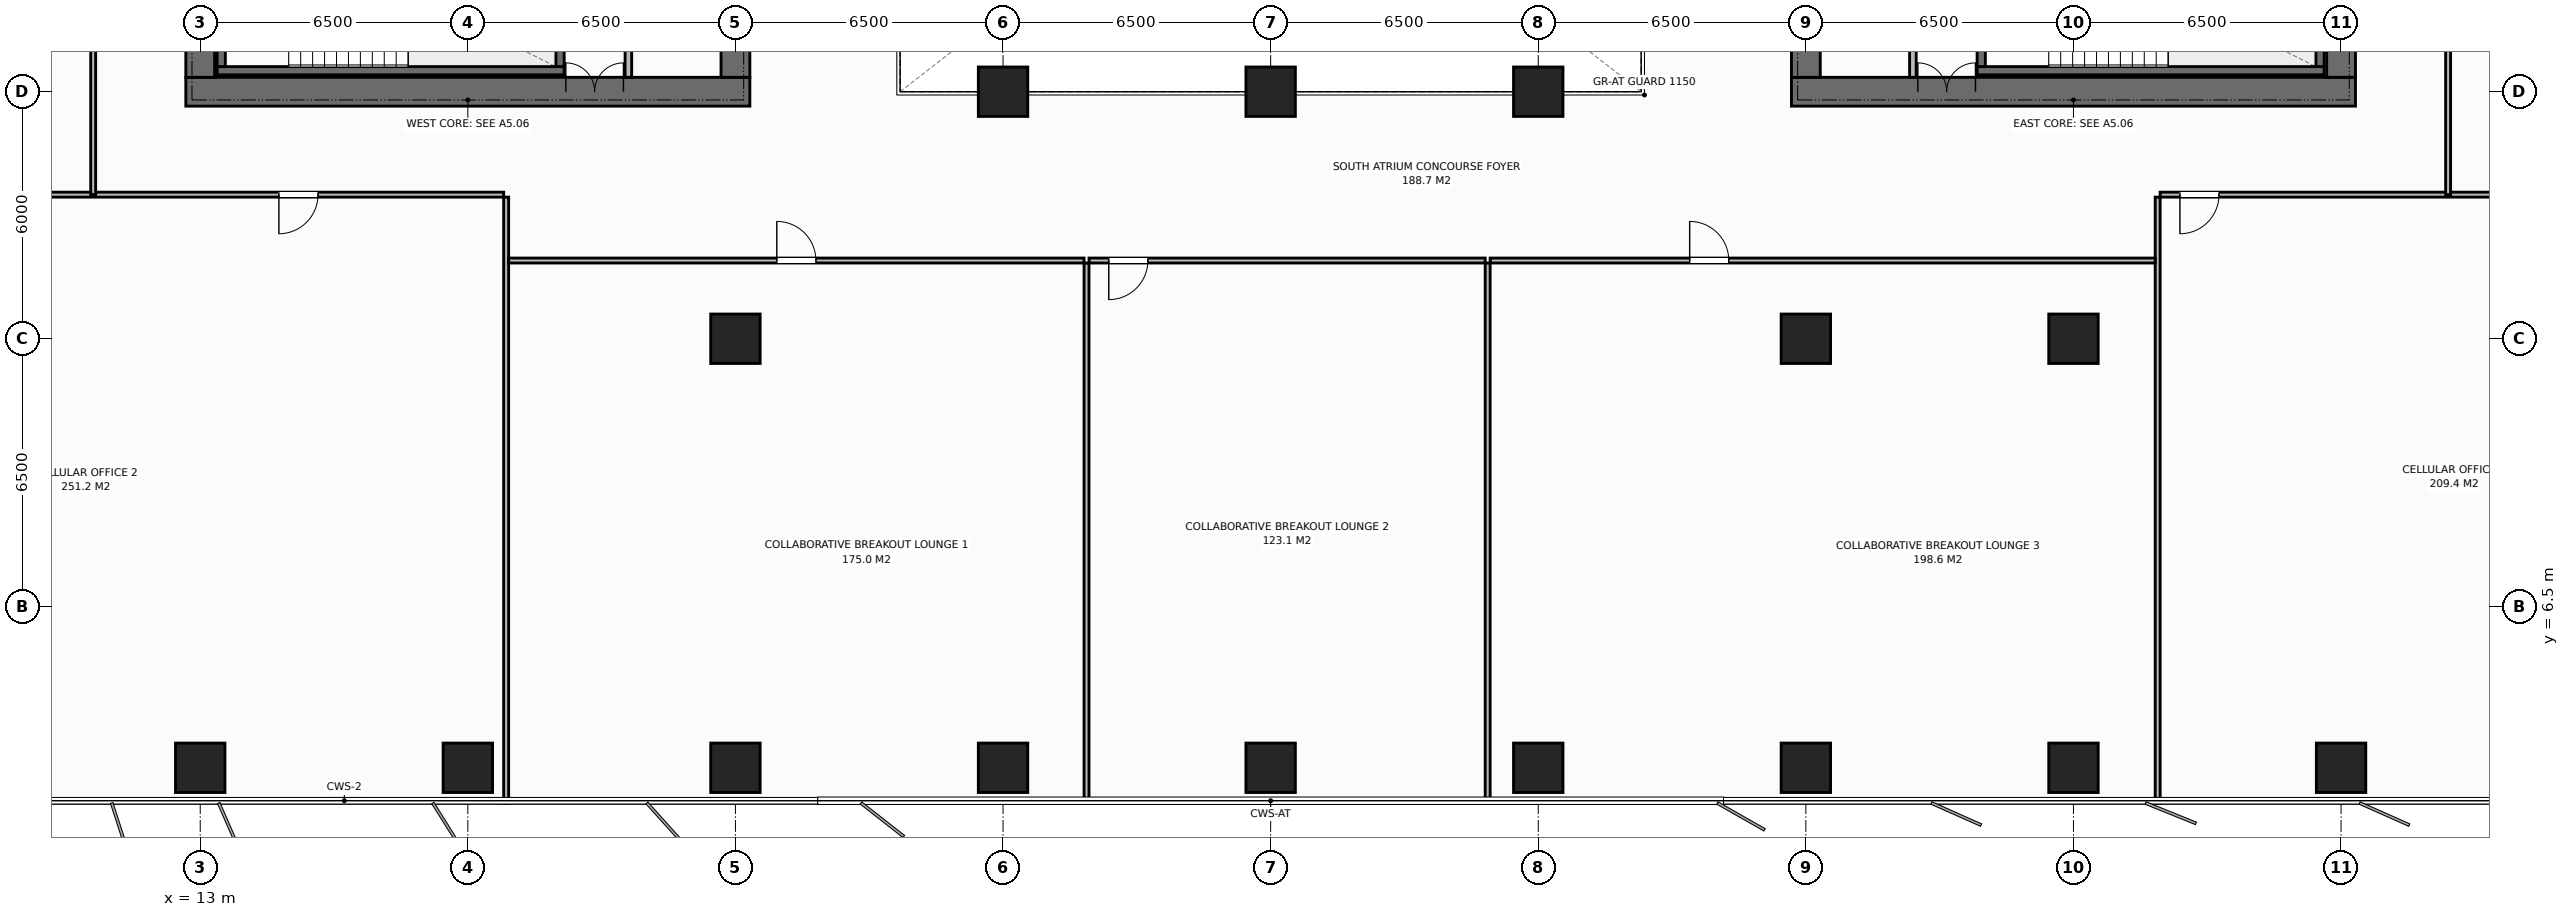
"""IFC4 building model, lengths in metres.
Left out: names, types, materials, properties, quantities, classifications, styles, units other than length and angle.
Written with IfcOpenShell. Run it as: python <this file> out.ifc"""

import sys

from ifc_helpers import new_model, si_unit, direction, frame, frame_2d, origin, origin_2d, place, context, subcontext, project, spatial, rectangle, extrude, element, fill, save


model = new_model("IFC4")
c1 = context("Model", 3, precision=1e-05, world=origin(), true_north=direction((0.0, 1.0)))
c2 = subcontext(c1, "Body", "Model", "MODEL_VIEW")
j1 = project(units=[si_unit("LENGTHUNIT", "METRE"), si_unit("PLANEANGLEUNIT", "RADIAN")], contexts=[c1])
p1 = place(None, origin())
s1 = spatial("IfcSite", under=j1, at=p1, CompositionType="ELEMENT")
p2 = place(p1, origin())
s2 = spatial("IfcBuilding", under=s1, at=p2, CompositionType="ELEMENT")
p3 = place(p2, frame((0.0, 0.0, 105.0)))
s3 = spatial("IfcBuildingStorey", under=s2, at=p3, CompositionType="ELEMENT", Elevation=105.0)
p4 = place(p3, frame((12.65, 19.0, 0.0), z_axis=(0.0, 0.0, 1.0), x_axis=(1.0, 0.0, 0.0)))
e1 = element("IfcWall", 1, at=p4, inside=s3, PredefinedType="SHEAR", context=c2, shape_type="SweptSolid", body=[
    extrude(rectangle(XDim=13.7, YDim=0.7, at=frame_2d((6.85, 0.0))), origin(), (0.0, 0.0, 1.0), 3.8),
])
p5 = place(p4, frame((9.23, 0.0, 0.0)))
e2 = element("IfcOpeningElement", 2, at=p5, cuts=e1, PredefinedType="OPENING", context=c2, shape_type="SweptSolid", body=[
    extrude(rectangle(XDim=1.4, YDim=2.2, at=frame_2d((0.7, 1.1))), frame((0.0, 0.36, 0.0), z_axis=(0.0, -1.0, 0.0), x_axis=(1.0, 0.0, 0.0)), (0.0, 0.0, 1.0), 0.72),
])
p6 = place(p3, frame((13.0, 19.35, 0.0), z_axis=(0.0, 0.0, 1.0), x_axis=(0.0, 1.0, 0.0)))
e3 = element("IfcWall", 3, at=p6, inside=s3, PredefinedType="SHEAR", context=c2, shape_type="SweptSolid", body=[
    extrude(rectangle(XDim=13.3, YDim=0.7, at=frame_2d((6.65, 0.0))), origin(), (0.0, 0.0, 1.0), 3.8),
])
p7 = place(p6, frame((4.7, 0.0, 0.0)))
e4 = element("IfcOpeningElement", 4, at=p7, cuts=e3, PredefinedType="OPENING", context=c2, shape_type="SweptSolid", body=[
    extrude(rectangle(XDim=1.4, YDim=2.2, at=frame_2d((0.7, 1.1))), frame((0.0, 0.36, 0.0), z_axis=(0.0, -1.0, 0.0), x_axis=(1.0, 0.0, 0.0)), (0.0, 0.0, 1.0), 0.72),
])
p8 = place(p3, frame((26.0, 19.35, 0.0), z_axis=(0.0, 0.0, 1.0), x_axis=(0.0, 1.0, 0.0)))
e5 = element("IfcWall", 5, at=p8, inside=s3, PredefinedType="SHEAR", context=c2, shape_type="SweptSolid", body=[
    extrude(rectangle(XDim=13.3, YDim=0.7, at=frame_2d((6.65, 0.0))), origin(), (0.0, 0.0, 1.0), 3.8),
])
p9 = place(p3, frame((51.65, 19.0, 0.0), z_axis=(0.0, 0.0, 1.0), x_axis=(1.0, 0.0, 0.0)))
e6 = element("IfcWall", 6, at=p9, inside=s3, PredefinedType="SHEAR", context=c2, shape_type="SweptSolid", body=[
    extrude(rectangle(XDim=13.7, YDim=0.7, at=frame_2d((6.85, 0.0))), origin(), (0.0, 0.0, 1.0), 3.8),
])
p10 = place(p9, frame((3.07, 0.0, 0.0)))
e7 = element("IfcOpeningElement", 7, at=p10, cuts=e6, PredefinedType="OPENING", context=c2, shape_type="SweptSolid", body=[
    extrude(rectangle(XDim=1.4, YDim=2.2, at=frame_2d((0.7, 1.1))), frame((0.0, 0.36, 0.0), z_axis=(0.0, -1.0, 0.0), x_axis=(1.0, 0.0, 0.0)), (0.0, 0.0, 1.0), 0.72),
])
p11 = place(p3, frame((52.0, 19.35, 0.0), z_axis=(0.0, 0.0, 1.0), x_axis=(0.0, 1.0, 0.0)))
e8 = element("IfcWall", 8, at=p11, inside=s3, PredefinedType="SHEAR", context=c2, shape_type="SweptSolid", body=[
    extrude(rectangle(XDim=13.3, YDim=0.7, at=frame_2d((6.65, 0.0))), origin(), (0.0, 0.0, 1.0), 3.8),
])
p12 = place(p3, frame((65.0, 19.35, 0.0), z_axis=(0.0, 0.0, 1.0), x_axis=(0.0, 1.0, 0.0)))
e9 = element("IfcWall", 9, at=p12, inside=s3, PredefinedType="SHEAR", context=c2, shape_type="SweptSolid", body=[
    extrude(rectangle(XDim=13.3, YDim=0.7, at=frame_2d((6.65, 0.0))), origin(), (0.0, 0.0, 1.0), 3.8),
])
p13 = place(p12, frame((8.1, 0.0, 0.0)))
e10 = element("IfcOpeningElement", 10, at=p13, cuts=e9, PredefinedType="OPENING", context=c2, shape_type="SweptSolid", body=[
    extrude(rectangle(XDim=1.3, YDim=2.2, at=frame_2d((0.65, 1.1))), frame((0.0, 0.36, 0.0), z_axis=(0.0, -1.0, 0.0), x_axis=(1.0, 0.0, 0.0)), (0.0, 0.0, 1.0), 0.72),
])
p14 = place(p3, frame((13.41, 19.51, 0.0), z_axis=(0.0, 0.0, 1.0), x_axis=(1.0, 0.0, 0.0)))
e11 = element("IfcWall", 11, at=p14, inside=s3, PredefinedType="SHEAR", context=c2, shape_type="SweptSolid", body=[
    extrude(rectangle(XDim=8.43, YDim=0.2, at=frame_2d((4.215, 0.0))), origin(), (0.0, 0.0, 1.0), 3.8),
])
for number, where, z_axis, x_axis in (
    (12, (13.51, 19.61, 0.0), (0.0, 0.0, 1.0), (0.0, 1.0, 0.0)),
    (13, (21.74, 19.61, 0.0), (0.0, 0.0, 1.0), (0.0, 1.0, 0.0)),
):
    element("IfcWall", number, at=place(p3, frame(where, z_axis=z_axis, x_axis=x_axis)), inside=s3, PredefinedType="SHEAR", context=c2, shape_type="SweptSolid", body=[
        extrude(rectangle(XDim=3.28, YDim=0.2, at=frame_2d((1.64, 0.0))), origin(), (0.0, 0.0, 1.0), 3.8),
    ])
p15 = place(p3, frame((56.16, 19.51, 0.0), z_axis=(0.0, 0.0, 1.0), x_axis=(1.0, 0.0, 0.0)))
e14 = element("IfcWall", 14, at=p15, inside=s3, PredefinedType="SHEAR", context=c2, shape_type="SweptSolid", body=[
    extrude(rectangle(XDim=8.43, YDim=0.2, at=frame_2d((4.215, 0.0))), origin(), (0.0, 0.0, 1.0), 3.8),
])
for number, where, z_axis, x_axis in (
    (15, (56.26, 19.61, 0.0), (0.0, 0.0, 1.0), (0.0, 1.0, 0.0)),
    (16, (64.49, 19.61, 0.0), (0.0, 0.0, 1.0), (0.0, 1.0, 0.0)),
):
    element("IfcWall", number, at=place(p3, frame(where, z_axis=z_axis, x_axis=x_axis)), inside=s3, PredefinedType="SHEAR", context=c2, shape_type="SweptSolid", body=[
        extrude(rectangle(XDim=3.28, YDim=0.2, at=frame_2d((1.64, 0.0))), origin(), (0.0, 0.0, 1.0), 3.8),
    ])
for number, where, z_axis, x_axis in (
    (17, (58.5, 13.0, 0.0), (0.0, 0.0, 1.0), (1.0, 0.0, 0.0)),
    (18, (32.5, 19.0, 0.0), (0.0, 0.0, 1.0), (1.0, 0.0, 0.0)),
    (19, (39.0, 19.0, 0.0), (0.0, 0.0, 1.0), (1.0, 0.0, 0.0)),
    (20, (45.5, 19.0, 0.0), (0.0, 0.0, 1.0), (1.0, 0.0, 0.0)),
    (21, (26.0, 13.0, 0.0), (0.0, 0.0, 1.0), (1.0, 0.0, 0.0)),
    (22, (52.0, 13.0, 0.0), (0.0, 0.0, 1.0), (1.0, 0.0, 0.0)),
    (23, (13.0, 2.58, 0.0), (0.0, 0.0, 1.0), (1.0, 0.0, 0.0)),
    (24, (19.5, 2.58, 0.0), (0.0, 0.0, 1.0), (1.0, 0.0, 0.0)),
    (25, (26.0, 2.58, 0.0), (0.0, 0.0, 1.0), (1.0, 0.0, 0.0)),
    (26, (32.5, 2.58, 0.0), (0.0, 0.0, 1.0), (1.0, 0.0, 0.0)),
    (27, (39.0, 2.58, 0.0), (0.0, 0.0, 1.0), (1.0, 0.0, 0.0)),
    (28, (45.5, 2.58, 0.0), (0.0, 0.0, 1.0), (1.0, 0.0, 0.0)),
    (29, (52.0, 2.58, 0.0), (0.0, 0.0, 1.0), (1.0, 0.0, 0.0)),
    (30, (58.5, 2.58, 0.0), (0.0, 0.0, 1.0), (1.0, 0.0, 0.0)),
    (31, (65.0, 2.58, 0.0), (0.0, 0.0, 1.0), (1.0, 0.0, 0.0)),
):
    element("IfcColumn", number, at=place(p3, frame(where, z_axis=z_axis, x_axis=x_axis)), inside=s3, PredefinedType="COLUMN", context=c2, shape_type="SweptSolid", body=[
        extrude(rectangle(XDim=1.2, YDim=1.2, at=origin_2d()), origin(), (0.0, 0.0, 1.0), 3.8),
    ])
p16 = place(p3, frame((23.4, 19.35, 0.0), z_axis=(0.0, 0.0, 1.0), x_axis=(0.0, 1.0, 0.0)))
e32 = element("IfcWall", 32, at=p16, inside=s3, PredefinedType="STANDARD", context=c2, shape_type="SweptSolid", body=[
    extrude(rectangle(XDim=13.3, YDim=0.16, at=frame_2d((6.65, 0.0))), origin(), (0.0, 0.0, 1.0), 3.565),
])
p17 = place(p16, frame((1.65, 0.0, 0.0)))
e33 = element("IfcOpeningElement", 33, at=p17, cuts=e32, PredefinedType="OPENING", context=c2, shape_type="SweptSolid", body=[
    extrude(rectangle(XDim=0.95, YDim=2.15, at=frame_2d((0.475, 1.075))), frame((0.0, 0.09, 0.0), z_axis=(0.0, -1.0, 0.0), x_axis=(1.0, 0.0, 0.0)), (0.0, 0.0, 1.0), 0.18),
])
p18 = place(p16, frame((4.95, 0.0, 0.0)))
e34 = element("IfcOpeningElement", 34, at=p18, cuts=e32, PredefinedType="OPENING", context=c2, shape_type="SweptSolid", body=[
    extrude(rectangle(XDim=1.1, YDim=2.2, at=frame_2d((0.55, 1.1))), frame((0.0, 0.09, 0.0), z_axis=(0.0, -1.0, 0.0), x_axis=(1.0, 0.0, 0.0)), (0.0, 0.0, 1.0), 0.18),
])
p19 = place(p16, frame((7.1, 0.0, 0.0)))
e35 = element("IfcOpeningElement", 35, at=p19, cuts=e32, PredefinedType="OPENING", context=c2, shape_type="SweptSolid", body=[
    extrude(rectangle(XDim=1.1, YDim=2.2, at=frame_2d((0.55, 1.1))), frame((0.0, 0.09, 0.0), z_axis=(0.0, -1.0, 0.0), x_axis=(1.0, 0.0, 0.0)), (0.0, 0.0, 1.0), 0.18),
])
p20 = place(p3, frame((54.6, 19.35, 0.0), z_axis=(0.0, 0.0, 1.0), x_axis=(0.0, 1.0, 0.0)))
e36 = element("IfcWall", 36, at=p20, inside=s3, PredefinedType="STANDARD", context=c2, shape_type="SweptSolid", body=[
    extrude(rectangle(XDim=13.3, YDim=0.16, at=frame_2d((6.65, 0.0))), origin(), (0.0, 0.0, 1.0), 3.565),
])
p21 = place(p20, frame((1.65, 0.0, 0.0)))
e37 = element("IfcOpeningElement", 37, at=p21, cuts=e36, PredefinedType="OPENING", context=c2, shape_type="SweptSolid", body=[
    extrude(rectangle(XDim=0.95, YDim=2.15, at=frame_2d((0.475, 1.075))), frame((0.0, 0.09, 0.0), z_axis=(0.0, -1.0, 0.0), x_axis=(1.0, 0.0, 0.0)), (0.0, 0.0, 1.0), 0.18),
])
p22 = place(p20, frame((4.95, 0.0, 0.0)))
e38 = element("IfcOpeningElement", 38, at=p22, cuts=e36, PredefinedType="OPENING", context=c2, shape_type="SweptSolid", body=[
    extrude(rectangle(XDim=1.1, YDim=2.2, at=frame_2d((0.55, 1.1))), frame((0.0, 0.09, 0.0), z_axis=(0.0, -1.0, 0.0), x_axis=(1.0, 0.0, 0.0)), (0.0, 0.0, 1.0), 0.18),
])
p23 = place(p20, frame((7.1, 0.0, 0.0)))
e39 = element("IfcOpeningElement", 39, at=p23, cuts=e36, PredefinedType="OPENING", context=c2, shape_type="SweptSolid", body=[
    extrude(rectangle(XDim=1.1, YDim=2.2, at=frame_2d((0.55, 1.1))), frame((0.0, 0.09, 0.0), z_axis=(0.0, -1.0, 0.0), x_axis=(1.0, 0.0, 0.0)), (0.0, 0.0, 1.0), 0.18),
])
p24 = place(p3, frame((20.431, 1.72, 0.0), z_axis=(0.0, 0.0, 1.0), x_axis=(0.0, 1.0, 0.0)))
e40 = element("IfcWall", 40, at=p24, inside=s3, PredefinedType="PARTITIONING", context=c2, shape_type="SweptSolid", body=[
    extrude(rectangle(XDim=14.72, YDim=0.12, at=frame_2d((7.36, 0.0))), origin(), (0.0, 0.0, 1.0), 3.565),
])
p25 = place(p3, frame((1.98, 16.5, 0.0), z_axis=(0.0, 0.0, 1.0), x_axis=(1.0, 0.0, 0.0)))
e41 = element("IfcWall", 41, at=p25, inside=s3, PredefinedType="PARTITIONING", context=c2, shape_type="SweptSolid", body=[
    extrude(rectangle(XDim=18.391, YDim=0.12, at=frame_2d((9.195, 0.0))), origin(), (0.0, 0.0, 1.0), 3.565),
])
p26 = place(p25, frame((12.93, 0.0, 0.0)))
e42 = element("IfcOpeningElement", 42, at=p26, cuts=e41, PredefinedType="OPENING", context=c2, shape_type="SweptSolid", body=[
    extrude(rectangle(XDim=0.95, YDim=2.15, at=frame_2d((0.475, 1.075))), frame((0.0, 0.07, 0.0), z_axis=(0.0, -1.0, 0.0), x_axis=(1.0, 0.0, 0.0)), (0.0, 0.0, 1.0), 0.14),
])
p27 = place(p3, frame((34.528, 1.72, 0.0), z_axis=(0.0, 0.0, 1.0), x_axis=(0.0, 1.0, 0.0)))
e43 = element("IfcWall", 43, at=p27, inside=s3, PredefinedType="PARTITIONING", context=c2, shape_type="SweptSolid", body=[
    extrude(rectangle(XDim=13.12, YDim=0.12, at=frame_2d((6.56, 0.0))), origin(), (0.0, 0.0, 1.0), 3.565),
])
p28 = place(p3, frame((20.491, 14.9, 0.0), z_axis=(0.0, 0.0, 1.0), x_axis=(1.0, 0.0, 0.0)))
e44 = element("IfcWall", 44, at=p28, inside=s3, PredefinedType="PARTITIONING", context=c2, shape_type="SweptSolid", body=[
    extrude(rectangle(XDim=13.977, YDim=0.12, at=frame_2d((6.989, 0.0))), origin(), (0.0, 0.0, 1.0), 3.565),
])
p29 = place(p28, frame((6.514, 0.0, 0.0)))
e45 = element("IfcOpeningElement", 45, at=p29, cuts=e44, PredefinedType="OPENING", context=c2, shape_type="SweptSolid", body=[
    extrude(rectangle(XDim=0.95, YDim=2.15, at=frame_2d((0.475, 1.075))), frame((0.0, 0.07, 0.0), z_axis=(0.0, -1.0, 0.0), x_axis=(1.0, 0.0, 0.0)), (0.0, 0.0, 1.0), 0.14),
])
p30 = place(p3, frame((44.271, 1.72, 0.0), z_axis=(0.0, 0.0, 1.0), x_axis=(0.0, 1.0, 0.0)))
e46 = element("IfcWall", 46, at=p30, inside=s3, PredefinedType="PARTITIONING", context=c2, shape_type="SweptSolid", body=[
    extrude(rectangle(XDim=13.12, YDim=0.12, at=frame_2d((6.56, 0.0))), origin(), (0.0, 0.0, 1.0), 3.565),
])
p31 = place(p3, frame((34.588, 14.9, 0.0), z_axis=(0.0, 0.0, 1.0), x_axis=(1.0, 0.0, 0.0)))
e47 = element("IfcWall", 47, at=p31, inside=s3, PredefinedType="PARTITIONING", context=c2, shape_type="SweptSolid", body=[
    extrude(rectangle(XDim=9.624, YDim=0.12, at=frame_2d((4.812, 0.0))), origin(), (0.0, 0.0, 1.0), 3.565),
])
p32 = place(p31, frame((0.48, 0.0, 0.0)))
e48 = element("IfcOpeningElement", 48, at=p32, cuts=e47, PredefinedType="OPENING", context=c2, shape_type="SweptSolid", body=[
    extrude(rectangle(XDim=0.95, YDim=2.15, at=frame_2d((0.475, 1.075))), frame((0.0, 0.07, 0.0), z_axis=(0.0, -1.0, 0.0), x_axis=(1.0, 0.0, 0.0)), (0.0, 0.0, 1.0), 0.14),
])
p33 = place(p3, frame((60.546, 1.72, 0.0), z_axis=(0.0, 0.0, 1.0), x_axis=(0.0, 1.0, 0.0)))
e49 = element("IfcWall", 49, at=p33, inside=s3, PredefinedType="PARTITIONING", context=c2, shape_type="SweptSolid", body=[
    extrude(rectangle(XDim=14.72, YDim=0.12, at=frame_2d((7.36, 0.0))), origin(), (0.0, 0.0, 1.0), 3.565),
])
p34 = place(p3, frame((44.332, 14.9, 0.0), z_axis=(0.0, 0.0, 1.0), x_axis=(1.0, 0.0, 0.0)))
e50 = element("IfcWall", 50, at=p34, inside=s3, PredefinedType="PARTITIONING", context=c2, shape_type="SweptSolid", body=[
    extrude(rectangle(XDim=16.154, YDim=0.12, at=frame_2d((8.077, 0.0))), origin(), (0.0, 0.0, 1.0), 3.565),
])
p35 = place(p34, frame((4.846, 0.0, 0.0)))
e51 = element("IfcOpeningElement", 51, at=p35, cuts=e50, PredefinedType="OPENING", context=c2, shape_type="SweptSolid", body=[
    extrude(rectangle(XDim=0.95, YDim=2.15, at=frame_2d((0.475, 1.075))), frame((0.0, 0.07, 0.0), z_axis=(0.0, -1.0, 0.0), x_axis=(1.0, 0.0, 0.0)), (0.0, 0.0, 1.0), 0.14),
])
p36 = place(p3, frame((60.606, 16.5, 0.0), z_axis=(0.0, 0.0, 1.0), x_axis=(1.0, 0.0, 0.0)))
e52 = element("IfcWall", 52, at=p36, inside=s3, PredefinedType="PARTITIONING", context=c2, shape_type="SweptSolid", body=[
    extrude(rectangle(XDim=15.414, YDim=0.12, at=frame_2d((7.707, 0.0))), origin(), (0.0, 0.0, 1.0), 3.565),
])
p37 = place(p36, frame((0.48, 0.0, 0.0)))
e53 = element("IfcOpeningElement", 53, at=p37, cuts=e52, PredefinedType="OPENING", context=c2, shape_type="SweptSolid", body=[
    extrude(rectangle(XDim=0.95, YDim=2.15, at=frame_2d((0.475, 1.075))), frame((0.0, 0.07, 0.0), z_axis=(0.0, -1.0, 0.0), x_axis=(1.0, 0.0, 0.0)), (0.0, 0.0, 1.0), 0.14),
])
p38 = place(p3, frame((10.4, 16.5, 0.0), z_axis=(0.0, 0.0, 1.0), x_axis=(0.0, 1.0, 0.0)))
e54 = element("IfcWall", 54, at=p38, inside=s3, PredefinedType="PARTITIONING", context=c2, shape_type="SweptSolid", body=[
    extrude(rectangle(XDim=9.5, YDim=0.12, at=frame_2d((4.75, 0.0))), origin(), (0.0, 0.0, 1.0), 3.565),
])
p39 = place(p38, frame((5.325, 0.0, 0.0)))
e55 = element("IfcOpeningElement", 55, at=p39, cuts=e54, PredefinedType="OPENING", context=c2, shape_type="SweptSolid", body=[
    extrude(rectangle(XDim=0.95, YDim=2.15, at=frame_2d((0.475, 1.075))), frame((0.0, 0.07, 0.0), z_axis=(0.0, -1.0, 0.0), x_axis=(1.0, 0.0, 0.0)), (0.0, 0.0, 1.0), 0.14),
])
p40 = place(p3, frame((67.6, 16.5, 0.0), z_axis=(0.0, 0.0, 1.0), x_axis=(0.0, 1.0, 0.0)))
e56 = element("IfcWall", 56, at=p40, inside=s3, PredefinedType="PARTITIONING", context=c2, shape_type="SweptSolid", body=[
    extrude(rectangle(XDim=16.9, YDim=0.12, at=frame_2d((8.45, 0.0))), origin(), (0.0, 0.0, 1.0), 3.565),
])
p41 = place(p40, frame((9.025, 0.0, 0.0)))
e57 = element("IfcOpeningElement", 57, at=p41, cuts=e56, PredefinedType="OPENING", context=c2, shape_type="SweptSolid", body=[
    extrude(rectangle(XDim=0.95, YDim=2.15, at=frame_2d((0.475, 1.075))), frame((0.0, 0.07, 0.0), z_axis=(0.0, -1.0, 0.0), x_axis=(1.0, 0.0, 0.0)), (0.0, 0.0, 1.0), 0.14),
])
p42 = place(p5, origin())
e58 = element("IfcDoor", 58, at=p42, inside=s3, OperationType="DOUBLE_DOOR_SINGLE_SWING", PredefinedType="DOOR", context=c2, shape_type="SweptSolid", body=[
    extrude(rectangle(XDim=1.4, YDim=2.2, at=frame_2d((0.7, 1.1))), frame((0.0, 0.125, 0.0), z_axis=(0.0, -1.0, 0.0), x_axis=(1.0, 0.0, 0.0)), (0.0, 0.0, 1.0), 0.05),
])
fill(e2, e58)
p43 = place(p10, origin())
e59 = element("IfcDoor", 59, at=p43, inside=s3, OperationType="DOUBLE_DOOR_SINGLE_SWING", PredefinedType="DOOR", context=c2, shape_type="SweptSolid", body=[
    extrude(rectangle(XDim=1.4, YDim=2.2, at=frame_2d((0.7, 1.1))), frame((0.0, 0.125, 0.0), z_axis=(0.0, -1.0, 0.0), x_axis=(1.0, 0.0, 0.0)), (0.0, 0.0, 1.0), 0.05),
])
fill(e7, e59)
p44 = place(p26, origin())
e60 = element("IfcDoor", 60, at=p44, inside=s3, OperationType="SINGLE_SWING_RIGHT", PredefinedType="DOOR", context=c2, shape_type="SweptSolid", body=[
    extrude(rectangle(XDim=0.95, YDim=2.15, at=frame_2d((0.475, 1.075))), frame((0.0, 0.025, 0.0), z_axis=(0.0, -1.0, 0.0), x_axis=(1.0, 0.0, 0.0)), (0.0, 0.0, 1.0), 0.05),
])
fill(e42, e60)
p45 = place(p29, origin())
e61 = element("IfcDoor", 61, at=p45, inside=s3, OperationType="SINGLE_SWING_LEFT", PredefinedType="DOOR", context=c2, shape_type="SweptSolid", body=[
    extrude(rectangle(XDim=0.95, YDim=2.15, at=frame_2d((0.475, 1.075))), frame((0.0, 0.025, 0.0), z_axis=(0.0, -1.0, 0.0), x_axis=(1.0, 0.0, 0.0)), (0.0, 0.0, 1.0), 0.05),
])
fill(e45, e61)
p46 = place(p32, origin())
e62 = element("IfcDoor", 62, at=p46, inside=s3, OperationType="SINGLE_SWING_RIGHT", PredefinedType="DOOR", context=c2, shape_type="SweptSolid", body=[
    extrude(rectangle(XDim=0.95, YDim=2.15, at=frame_2d((0.475, 1.075))), frame((0.0, 0.025, 0.0), z_axis=(0.0, -1.0, 0.0), x_axis=(1.0, 0.0, 0.0)), (0.0, 0.0, 1.0), 0.05),
])
fill(e48, e62)
p47 = place(p35, origin())
e63 = element("IfcDoor", 63, at=p47, inside=s3, OperationType="SINGLE_SWING_LEFT", PredefinedType="DOOR", context=c2, shape_type="SweptSolid", body=[
    extrude(rectangle(XDim=0.95, YDim=2.15, at=frame_2d((0.475, 1.075))), frame((0.0, 0.025, 0.0), z_axis=(0.0, -1.0, 0.0), x_axis=(1.0, 0.0, 0.0)), (0.0, 0.0, 1.0), 0.05),
])
fill(e51, e63)
p48 = place(p37, origin())
e64 = element("IfcDoor", 64, at=p48, inside=s3, OperationType="SINGLE_SWING_RIGHT", PredefinedType="DOOR", context=c2, shape_type="SweptSolid", body=[
    extrude(rectangle(XDim=0.95, YDim=2.15, at=frame_2d((0.475, 1.075))), frame((0.0, 0.025, 0.0), z_axis=(0.0, -1.0, 0.0), x_axis=(1.0, 0.0, 0.0)), (0.0, 0.0, 1.0), 0.05),
])
fill(e53, e64)
save(model, sys.argv[1])
